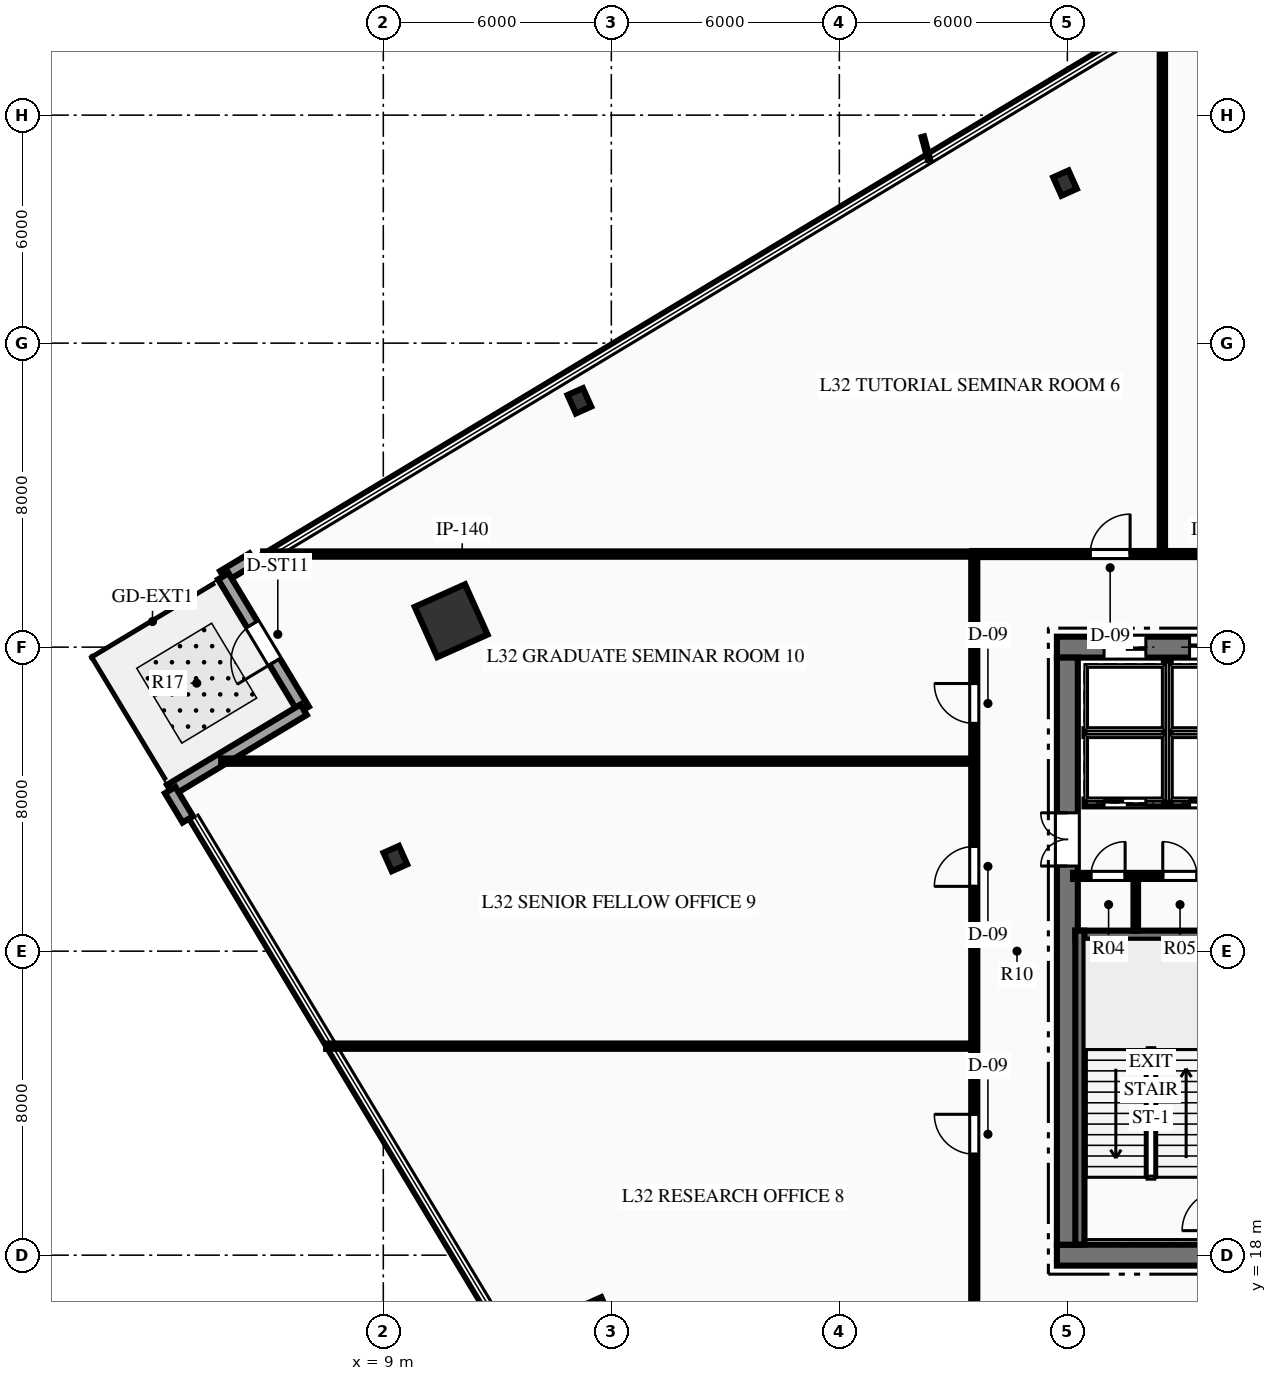
"""IFC4 building model, lengths in metres.
Left out: names, types, materials, properties, quantities, classifications, styles, units other than length and angle.
Written with IfcOpenShell. Run it as: python <this file> out.ifc"""

import sys

from ifc_helpers import new_model, si_unit, direction, frame, frame_2d, origin, origin_2d, place, context, subcontext, project, spatial, rectangle, hollow_rectangle, i_section, extrude, element, fill, save


model = new_model("IFC4")
c1 = context("Model", 3, precision=1e-05, world=origin(), true_north=direction((0.0, 1.0)))
c2 = subcontext(c1, "Body", "Model", "MODEL_VIEW")
j1 = project(units=[si_unit("LENGTHUNIT", "METRE"), si_unit("PLANEANGLEUNIT", "RADIAN")], contexts=[c1])
p1 = place(None, origin())
s1 = spatial("IfcSite", under=j1, at=p1, CompositionType="ELEMENT")
p2 = place(p1, origin())
s2 = spatial("IfcBuilding", under=s1, at=p2, CompositionType="ELEMENT")
p3 = place(p2, frame((0.0, 0.0, 131.7)))
s3 = spatial("IfcBuildingStorey", under=s2, at=p3, CompositionType="ELEMENT", Elevation=131.7)
p4 = place(p3, frame((26.725, 18.0, 0.0), z_axis=(0.0, 0.0, 1.0), x_axis=(1.0, 0.0, 0.0)))
e1 = element("IfcWall", 1, at=p4, inside=s3, PredefinedType="SHEAR", context=c2, shape_type="SweptSolid", body=[
    extrude(rectangle(XDim=18.55, YDim=0.55, at=frame_2d((9.275, 0.0))), origin(), (0.0, 0.0, 1.0), 4.5),
])
p5 = place(p4, frame((7.375, 0.0, 0.0)))
e2 = element("IfcOpeningElement", 2, at=p5, cuts=e1, PredefinedType="OPENING", context=c2, shape_type="SweptSolid", body=[
    extrude(rectangle(XDim=1.1, YDim=2.15, at=frame_2d((0.55, 1.075))), frame((0.0, 0.285, 0.0), z_axis=(0.0, -1.0, 0.0), x_axis=(1.0, 0.0, 0.0)), (0.0, 0.0, 1.0), 0.57),
])
p6 = place(p4, frame((10.075, 0.0, 0.0)))
e3 = element("IfcOpeningElement", 3, at=p6, cuts=e1, PredefinedType="OPENING", context=c2, shape_type="SweptSolid", body=[
    extrude(rectangle(XDim=1.1, YDim=2.15, at=frame_2d((0.55, 1.075))), frame((0.0, 0.285, 0.0), z_axis=(0.0, -1.0, 0.0), x_axis=(1.0, 0.0, 0.0)), (0.0, 0.0, 1.0), 0.57),
])
p7 = place(p3, frame((26.725, 34.0, 0.0), z_axis=(0.0, 0.0, 1.0), x_axis=(1.0, 0.0, 0.0)))
e4 = element("IfcWall", 4, at=p7, inside=s3, PredefinedType="SHEAR", context=c2, shape_type="SweptSolid", body=[
    extrude(rectangle(XDim=18.55, YDim=0.55, at=frame_2d((9.275, 0.0))), origin(), (0.0, 0.0, 1.0), 4.5),
])
p8 = place(p7, frame((1.24, 0.0, 0.0)))
e5 = element("IfcOpeningElement", 5, at=p8, cuts=e4, PredefinedType="OPENING", context=c2, shape_type="SweptSolid", body=[
    extrude(rectangle(XDim=1.1, YDim=2.15, at=frame_2d((0.55, 1.075))), frame((0.0, 0.285, 0.0), z_axis=(0.0, -1.0, 0.0), x_axis=(1.0, 0.0, 0.0)), (0.0, 0.0, 1.0), 0.57),
])
p9 = place(p7, frame((3.49, 0.0, 0.0)))
e6 = element("IfcOpeningElement", 6, at=p9, cuts=e4, PredefinedType="OPENING", context=c2, shape_type="SweptSolid", body=[
    extrude(rectangle(XDim=1.1, YDim=2.15, at=frame_2d((0.55, 1.075))), frame((0.0, 0.285, 0.0), z_axis=(0.0, -1.0, 0.0), x_axis=(1.0, 0.0, 0.0)), (0.0, 0.0, 1.0), 0.57),
])
p10 = place(p7, frame((13.96, 0.0, 0.0)))
e7 = element("IfcOpeningElement", 7, at=p10, cuts=e4, PredefinedType="OPENING", context=c2, shape_type="SweptSolid", body=[
    extrude(rectangle(XDim=1.1, YDim=2.15, at=frame_2d((0.55, 1.075))), frame((0.0, 0.285, 0.0), z_axis=(0.0, -1.0, 0.0), x_axis=(1.0, 0.0, 0.0)), (0.0, 0.0, 1.0), 0.57),
])
p11 = place(p7, frame((16.21, 0.0, 0.0)))
e8 = element("IfcOpeningElement", 8, at=p11, cuts=e4, PredefinedType="OPENING", context=c2, shape_type="SweptSolid", body=[
    extrude(rectangle(XDim=1.1, YDim=2.15, at=frame_2d((0.55, 1.075))), frame((0.0, 0.285, 0.0), z_axis=(0.0, -1.0, 0.0), x_axis=(1.0, 0.0, 0.0)), (0.0, 0.0, 1.0), 0.57),
])
p12 = place(p3, frame((27.0, 18.275, 0.0), z_axis=(0.0, 0.0, 1.0), x_axis=(0.0, 1.0, 0.0)))
e9 = element("IfcWall", 9, at=p12, inside=s3, PredefinedType="SHEAR", context=c2, shape_type="SweptSolid", body=[
    extrude(rectangle(XDim=15.45, YDim=0.55, at=frame_2d((7.725, 0.0))), origin(), (0.0, 0.0, 1.0), 4.5),
])
p13 = place(p12, frame((9.965, 0.0, 0.0)))
e10 = element("IfcOpeningElement", 10, at=p13, cuts=e9, PredefinedType="OPENING", context=c2, shape_type="SweptSolid", body=[
    extrude(rectangle(XDim=1.4, YDim=2.2, at=frame_2d((0.7, 1.1))), frame((0.0, 0.285, 0.0), z_axis=(0.0, -1.0, 0.0), x_axis=(1.0, 0.0, 0.0)), (0.0, 0.0, 1.0), 0.57),
])
p14 = place(p3, frame((27.21, 26.42, 0.0), z_axis=(0.0, 0.0, 1.0), x_axis=(1.0, 0.0, 0.0)))
e11 = element("IfcWall", 11, at=p14, inside=s3, PredefinedType="SHEAR", context=c2, shape_type="SweptSolid", body=[
    extrude(rectangle(XDim=3.98, YDim=0.24, at=frame_2d((1.99, 0.0))), origin(), (0.0, 0.0, 1.0), 4.5),
])
p15 = place(p3, frame((27.33, 18.28, 0.0), z_axis=(0.0, 0.0, 1.0), x_axis=(0.0, 1.0, 0.0)))
e12 = element("IfcWall", 12, at=p15, inside=s3, PredefinedType="SHEAR", context=c2, shape_type="SweptSolid", body=[
    extrude(rectangle(XDim=8.26, YDim=0.24, at=frame_2d((4.13, 0.0))), origin(), (0.0, 0.0, 1.0), 4.5),
])
p16 = place(p3, frame((10.786, 34.695, 0.0), z_axis=(0.0, 0.0, 1.0), x_axis=(0.912477494148, 0.409126902895, 0.0)))
e13 = element("IfcColumn", 13, at=p16, inside=s3, PredefinedType="COLUMN", context=c2, shape_type="SweptSolid", body=[
    extrude(hollow_rectangle(XDim=1.45, YDim=1.45, WallThickness=0.07, at=origin_2d()), origin(), (0.0, 0.0, 1.0), 4.5),
])
for number, where, z_axis, x_axis in (
    (14, (26.938, 46.211, 0.0), (0.0, 0.0, 1.0), (0.912, 0.409, 0.0)),
    (15, (14.159, 40.482, 0.0), (0.0, 0.0, 1.0), (0.912, 0.409, 0.0)),
    (16, (9.318, 28.437, 0.0), (0.0, 0.0, 1.0), (0.912, 0.409, 0.0)),
    (17, (14.643, 16.561, 0.0), (0.0, 0.0, 1.0), (0.912, 0.409, 0.0)),
):
    element("IfcColumn", number, at=place(p3, frame(where, z_axis=z_axis, x_axis=x_axis)), inside=s3, PredefinedType="COLUMN", context=c2, shape_type="SweptSolid", body=[
        extrude(i_section(OverallWidth=0.442, OverallDepth=0.531, WebThickness=0.066, FlangeThickness=0.106, at=origin_2d()), origin(), (0.0, 0.0, 1.0), 4.5),
    ])
p17 = place(p3, frame((4.79, 35.866, 0.0), z_axis=(0.0, 0.0, 1.0), x_axis=(0.856749961863, 0.515732006809, 0.0)))
e18 = element("IfcWall", 18, at=p17, inside=s3, PredefinedType="STANDARD", context=c2, shape_type="SweptSolid", body=[
    extrude(rectangle(XDim=0.9, YDim=0.32, at=frame_2d((0.45, 0.0))), origin(), (0.0, 0.0, 1.0), 4.1),
])
p18 = place(p3, frame((6.904, 32.353, 0.0), z_axis=(0.0, 0.0, 1.0), x_axis=(-0.515773637009, 0.856724900634, 0.0)))
e19 = element("IfcWall", 19, at=p18, inside=s3, PredefinedType="STANDARD", context=c2, shape_type="SweptSolid", body=[
    extrude(rectangle(XDim=4.1, YDim=0.32, at=frame_2d((2.05, 0.0))), origin(), (0.0, 0.0, 1.0), 4.1),
])
p19 = place(p18, frame((1.475, 0.0, 0.0)))
e20 = element("IfcOpeningElement", 20, at=p19, cuts=e19, PredefinedType="OPENING", context=c2, shape_type="SweptSolid", body=[
    extrude(rectangle(XDim=1.15, YDim=2.2, at=frame_2d((0.575, 1.1))), frame((0.0, 0.17, 0.0), z_axis=(0.0, -1.0, 0.0), x_axis=(1.0, 0.0, 0.0)), (0.0, 0.0, 1.0), 0.34),
])
p20 = place(p3, frame((3.392, 30.238, 0.0), z_axis=(0.0, 0.0, 1.0), x_axis=(0.856724900634, 0.515773637009, 0.0)))
e21 = element("IfcWall", 21, at=p20, inside=s3, PredefinedType="STANDARD", context=c2, shape_type="SweptSolid", body=[
    extrude(rectangle(XDim=4.1, YDim=0.32, at=frame_2d((2.05, 0.0))), origin(), (0.0, 0.0, 1.0), 4.1),
])
p21 = place(p3, frame((3.856, 29.467, 0.0), z_axis=(0.0, 0.0, 1.0), x_axis=(-0.51593110119, 0.856630082839, 0.0)))
e22 = element("IfcWall", 22, at=p21, inside=s3, PredefinedType="STANDARD", context=c2, shape_type="SweptSolid", body=[
    extrude(rectangle(XDim=0.9, YDim=0.32, at=frame_2d((0.45, 0.0))), origin(), (0.0, 0.0, 1.0), 4.1),
])
p22 = place(p3, frame((27.15, 27.98, 0.0), z_axis=(0.0, 0.0, 1.0), x_axis=(1.0, 0.0, 0.0)))
e23 = element("IfcWall", 23, at=p22, inside=s3, PredefinedType="PARTITIONING", context=c2, shape_type="SweptSolid", body=[
    extrude(rectangle(XDim=4.05, YDim=0.16, at=frame_2d((2.025, 0.0))), origin(), (0.0, 0.0, 1.0), 4.1),
])
p23 = place(p22, frame((0.47, 0.0, 0.0)))
e24 = element("IfcOpeningElement", 24, at=p23, cuts=e23, PredefinedType="OPENING", context=c2, shape_type="SweptSolid", body=[
    extrude(rectangle(XDim=0.9, YDim=2.15, at=frame_2d((0.45, 1.075))), frame((0.0, 0.09, 0.0), z_axis=(0.0, -1.0, 0.0), x_axis=(1.0, 0.0, 0.0)), (0.0, 0.0, 1.0), 0.18),
])
p24 = place(p22, frame((2.36, 0.0, 0.0)))
e25 = element("IfcOpeningElement", 25, at=p24, cuts=e23, PredefinedType="OPENING", context=c2, shape_type="SweptSolid", body=[
    extrude(rectangle(XDim=0.9, YDim=2.15, at=frame_2d((0.45, 1.075))), frame((0.0, 0.09, 0.0), z_axis=(0.0, -1.0, 0.0), x_axis=(1.0, 0.0, 0.0)), (0.0, 0.0, 1.0), 0.18),
])
p25 = place(p3, frame((28.8, 26.54, 0.0), z_axis=(0.0, 0.0, 1.0), x_axis=(0.0, 1.0, 0.0)))
e26 = element("IfcWall", 26, at=p25, inside=s3, PredefinedType="PARTITIONING", context=c2, shape_type="SweptSolid", body=[
    extrude(rectangle(XDim=1.44, YDim=0.12, at=frame_2d((0.72, 0.0))), origin(), (0.0, 0.0, 1.0), 4.1),
])
p26 = place(p3, frame((27.45, 29.9, 0.0), z_axis=(0.0, 0.0, 1.0), x_axis=(1.0, 0.0, 0.0)))
e27 = element("IfcWall", 27, at=p26, inside=s3, PredefinedType="PARTITIONING", context=c2, shape_type="SweptSolid", body=[
    extrude(rectangle(XDim=4.43, YDim=0.18, at=frame_2d((2.215, 0.0))), origin(), (0.0, 0.0, 1.0), 4.1),
])
p27 = place(p26, frame((0.515, 0.0, 0.0)))
e28 = element("IfcOpeningElement", 28, at=p27, cuts=e27, PredefinedType="OPENING", context=c2, shape_type="SweptSolid", body=[
    extrude(rectangle(XDim=1.1, YDim=2.15, at=frame_2d((0.55, 1.075))), frame((0.0, 0.1, 0.0), z_axis=(0.0, -1.0, 0.0), x_axis=(1.0, 0.0, 0.0)), (0.0, 0.0, 1.0), 0.2),
])
p28 = place(p26, frame((2.765, 0.0, 0.0)))
e29 = element("IfcOpeningElement", 29, at=p28, cuts=e27, PredefinedType="OPENING", context=c2, shape_type="SweptSolid", body=[
    extrude(rectangle(XDim=1.1, YDim=2.15, at=frame_2d((0.55, 1.075))), frame((0.0, 0.1, 0.0), z_axis=(0.0, -1.0, 0.0), x_axis=(1.0, 0.0, 0.0)), (0.0, 0.0, 1.0), 0.2),
])
p29 = place(p3, frame((27.45, 31.75, 0.0), z_axis=(0.0, 0.0, 1.0), x_axis=(1.0, 0.0, 0.0)))
e30 = element("IfcWall", 30, at=p29, inside=s3, PredefinedType="PARTITIONING", context=c2, shape_type="SweptSolid", body=[
    extrude(rectangle(XDim=4.43, YDim=0.18, at=frame_2d((2.215, 0.0))), origin(), (0.0, 0.0, 1.0), 4.1),
])
p30 = place(p3, frame((29.63, 29.9, 0.0), z_axis=(0.0, 0.0, 1.0), x_axis=(0.0, 1.0, 0.0)))
e31 = element("IfcWall", 31, at=p30, inside=s3, PredefinedType="PARTITIONING", context=c2, shape_type="SweptSolid", body=[
    extrude(rectangle(XDim=3.75, YDim=0.18, at=frame_2d((1.875, 0.0))), origin(), (0.0, 0.0, 1.0), 4.1),
])
p31 = place(p3, frame((24.5, 36.45, 0.0), z_axis=(0.0, 0.0, 1.0), x_axis=(1.0, 0.0, 0.0)))
e32 = element("IfcWall", 32, at=p31, inside=s3, PredefinedType="PARTITIONING", context=c2, shape_type="SweptSolid", body=[
    extrude(rectangle(XDim=23.0, YDim=0.16, at=frame_2d((11.5, 0.0))), origin(), (0.0, 0.0, 1.0), 4.1),
])
p32 = place(p31, frame((13.75, 0.0, 0.0)))
e33 = element("IfcOpeningElement", 33, at=p32, cuts=e32, PredefinedType="OPENING", context=c2, shape_type="SweptSolid", body=[
    extrude(rectangle(XDim=0.9, YDim=2.15, at=frame_2d((0.45, 1.075))), frame((0.0, 0.09, 0.0), z_axis=(0.0, -1.0, 0.0), x_axis=(1.0, 0.0, 0.0)), (0.0, 0.0, 1.0), 0.18),
])
p33 = place(p31, frame((16.05, 0.0, 0.0)))
e34 = element("IfcOpeningElement", 34, at=p33, cuts=e32, PredefinedType="OPENING", context=c2, shape_type="SweptSolid", body=[
    extrude(rectangle(XDim=0.9, YDim=2.15, at=frame_2d((0.45, 1.075))), frame((0.0, 0.09, 0.0), z_axis=(0.0, -1.0, 0.0), x_axis=(1.0, 0.0, 0.0)), (0.0, 0.0, 1.0), 0.18),
])
p34 = place(p31, frame((18.3, 0.0, 0.0)))
e35 = element("IfcOpeningElement", 35, at=p34, cuts=e32, PredefinedType="OPENING", context=c2, shape_type="SweptSolid", body=[
    extrude(rectangle(XDim=1.0, YDim=2.15, at=frame_2d((0.5, 1.075))), frame((0.0, 0.09, 0.0), z_axis=(0.0, -1.0, 0.0), x_axis=(1.0, 0.0, 0.0)), (0.0, 0.0, 1.0), 0.18),
])
p35 = place(p31, frame((3.101, 0.0, 0.0)))
e36 = element("IfcOpeningElement", 36, at=p35, cuts=e32, PredefinedType="OPENING", context=c2, shape_type="SweptSolid", body=[
    extrude(rectangle(XDim=1.05, YDim=2.15, at=frame_2d((0.525, 1.075))), frame((0.0, 0.09, 0.0), z_axis=(0.0, -1.0, 0.0), x_axis=(1.0, 0.0, 0.0)), (0.0, 0.0, 1.0), 0.18),
])
p36 = place(p31, frame((10.055, 0.0, 0.0)))
e37 = element("IfcOpeningElement", 37, at=p36, cuts=e32, PredefinedType="OPENING", context=c2, shape_type="SweptSolid", body=[
    extrude(rectangle(XDim=1.05, YDim=2.15, at=frame_2d((0.525, 1.075))), frame((0.0, 0.09, 0.0), z_axis=(0.0, -1.0, 0.0), x_axis=(1.0, 0.0, 0.0)), (0.0, 0.0, 1.0), 0.18),
])
p37 = place(p3, frame((24.55, 15.55, 0.0), z_axis=(0.0, 0.0, 1.0), x_axis=(0.0, 1.0, 0.0)))
e38 = element("IfcWall", 38, at=p37, inside=s3, PredefinedType="PARTITIONING", context=c2, shape_type="SweptSolid", body=[
    extrude(rectangle(XDim=20.9, YDim=0.16, at=frame_2d((10.45, 0.0))), origin(), (0.0, 0.0, 1.0), 4.1),
])
p38 = place(p37, frame((5.107, 0.0, 0.0)))
e39 = element("IfcOpeningElement", 39, at=p38, cuts=e38, PredefinedType="OPENING", context=c2, shape_type="SweptSolid", body=[
    extrude(rectangle(XDim=1.05, YDim=2.15, at=frame_2d((0.525, 1.075))), frame((0.0, 0.09, 0.0), z_axis=(0.0, -1.0, 0.0), x_axis=(1.0, 0.0, 0.0)), (0.0, 0.0, 1.0), 0.18),
])
p39 = place(p37, frame((12.155, 0.0, 0.0)))
e40 = element("IfcOpeningElement", 40, at=p39, cuts=e38, PredefinedType="OPENING", context=c2, shape_type="SweptSolid", body=[
    extrude(rectangle(XDim=1.05, YDim=2.15, at=frame_2d((0.525, 1.075))), frame((0.0, 0.09, 0.0), z_axis=(0.0, -1.0, 0.0), x_axis=(1.0, 0.0, 0.0)), (0.0, 0.0, 1.0), 0.18),
])
p40 = place(p37, frame((16.443, 0.0, 0.0)))
e41 = element("IfcOpeningElement", 41, at=p40, cuts=e38, PredefinedType="OPENING", context=c2, shape_type="SweptSolid", body=[
    extrude(rectangle(XDim=1.05, YDim=2.15, at=frame_2d((0.525, 1.075))), frame((0.0, 0.09, 0.0), z_axis=(0.0, -1.0, 0.0), x_axis=(1.0, 0.0, 0.0)), (0.0, 0.0, 1.0), 0.18),
])
p41 = place(p3, frame((5.838, 36.45, 0.0), z_axis=(0.0, 0.0, 1.0), x_axis=(1.0, 0.0, 0.0)))
e42 = element("IfcWall", 42, at=p41, inside=s3, PredefinedType="PARTITIONING", context=c2, shape_type="SweptSolid", body=[
    extrude(rectangle(XDim=18.712, YDim=0.14, at=frame_2d((9.356, 0.0))), origin(), (0.0, 0.0, 1.0), 4.1),
])
p42 = place(p3, frame((29.5, 36.45, 0.0), z_axis=(0.0, 0.0, 1.0), x_axis=(0.0, 1.0, 0.0)))
e43 = element("IfcWall", 43, at=p42, inside=s3, PredefinedType="PARTITIONING", context=c2, shape_type="SweptSolid", body=[
    extrude(rectangle(XDim=14.246, YDim=0.14, at=frame_2d((7.123, 0.0))), origin(), (0.0, 0.0, 1.0), 4.1),
])
p43 = place(p3, frame((7.495, 23.5, 0.0), z_axis=(0.0, 0.0, 1.0), x_axis=(1.0, 0.0, 0.0)))
e44 = element("IfcWall", 44, at=p43, inside=s3, PredefinedType="PARTITIONING", context=c2, shape_type="SweptSolid", body=[
    extrude(rectangle(XDim=17.055, YDim=0.14, at=frame_2d((8.527, 0.0))), origin(), (0.0, 0.0, 1.0), 4.1),
])
p44 = place(p3, frame((4.734, 31.0, 0.0), z_axis=(0.0, 0.0, 1.0), x_axis=(1.0, 0.0, 0.0)))
e45 = element("IfcWall", 45, at=p44, inside=s3, PredefinedType="PARTITIONING", context=c2, shape_type="SweptSolid", body=[
    extrude(rectangle(XDim=19.816, YDim=0.14, at=frame_2d((9.908, 0.0))), origin(), (0.0, 0.0, 1.0), 4.1),
])
p45 = place(p19, origin())
e46 = element("IfcDoor", 46, at=p45, inside=s3, OperationType="SINGLE_SWING_LEFT", PredefinedType="DOOR", context=c2, shape_type="SweptSolid", body=[
    extrude(rectangle(XDim=1.15, YDim=2.2, at=frame_2d((0.575, 1.1))), frame((0.0, 0.025, 0.0), z_axis=(0.0, -1.0, 0.0), x_axis=(1.0, 0.0, 0.0)), (0.0, 0.0, 1.0), 0.05),
])
fill(e20, e46)
p46 = place(p23, origin())
e47 = element("IfcDoor", 47, at=p46, inside=s3, OperationType="SINGLE_SWING_RIGHT", PredefinedType="DOOR", context=c2, shape_type="SweptSolid", body=[
    extrude(rectangle(XDim=0.9, YDim=2.15, at=frame_2d((0.45, 1.075))), frame((0.0, 0.025, 0.0), z_axis=(0.0, -1.0, 0.0), x_axis=(1.0, 0.0, 0.0)), (0.0, 0.0, 1.0), 0.05),
])
fill(e24, e47)
p47 = place(p24, origin())
e48 = element("IfcDoor", 48, at=p47, inside=s3, OperationType="SINGLE_SWING_LEFT", PredefinedType="DOOR", context=c2, shape_type="SweptSolid", body=[
    extrude(rectangle(XDim=0.9, YDim=2.15, at=frame_2d((0.45, 1.075))), frame((0.0, 0.025, 0.0), z_axis=(0.0, -1.0, 0.0), x_axis=(1.0, 0.0, 0.0)), (0.0, 0.0, 1.0), 0.05),
])
fill(e25, e48)
p48 = place(p13, origin())
e49 = element("IfcDoor", 49, at=p48, inside=s3, OperationType="DOUBLE_DOOR_SINGLE_SWING", PredefinedType="DOOR", context=c2, shape_type="SweptSolid", body=[
    extrude(rectangle(XDim=1.4, YDim=2.2, at=frame_2d((0.7, 1.1))), frame((0.0, 0.025, 0.0), z_axis=(0.0, -1.0, 0.0), x_axis=(1.0, 0.0, 0.0)), (0.0, 0.0, 1.0), 0.05),
])
fill(e10, e49)
p49 = place(p35, origin())
e50 = element("IfcDoor", 50, at=p49, inside=s3, OperationType="SINGLE_SWING_RIGHT", PredefinedType="DOOR", context=c2, shape_type="SweptSolid", body=[
    extrude(rectangle(XDim=1.05, YDim=2.15, at=frame_2d((0.525, 1.075))), frame((0.0, 0.025, 0.0), z_axis=(0.0, -1.0, 0.0), x_axis=(1.0, 0.0, 0.0)), (0.0, 0.0, 1.0), 0.05),
])
fill(e36, e50)
p50 = place(p38, origin())
e51 = element("IfcDoor", 51, at=p50, inside=s3, OperationType="SINGLE_SWING_RIGHT", PredefinedType="DOOR", context=c2, shape_type="SweptSolid", body=[
    extrude(rectangle(XDim=1.05, YDim=2.15, at=frame_2d((0.525, 1.075))), frame((0.0, 0.025, 0.0), z_axis=(0.0, -1.0, 0.0), x_axis=(1.0, 0.0, 0.0)), (0.0, 0.0, 1.0), 0.05),
])
fill(e39, e51)
p51 = place(p39, origin())
e52 = element("IfcDoor", 52, at=p51, inside=s3, OperationType="SINGLE_SWING_LEFT", PredefinedType="DOOR", context=c2, shape_type="SweptSolid", body=[
    extrude(rectangle(XDim=1.05, YDim=2.15, at=frame_2d((0.525, 1.075))), frame((0.0, 0.025, 0.0), z_axis=(0.0, -1.0, 0.0), x_axis=(1.0, 0.0, 0.0)), (0.0, 0.0, 1.0), 0.05),
])
fill(e40, e52)
p52 = place(p40, origin())
e53 = element("IfcDoor", 53, at=p52, inside=s3, OperationType="SINGLE_SWING_RIGHT", PredefinedType="DOOR", context=c2, shape_type="SweptSolid", body=[
    extrude(rectangle(XDim=1.05, YDim=2.15, at=frame_2d((0.525, 1.075))), frame((0.0, 0.025, 0.0), z_axis=(0.0, -1.0, 0.0), x_axis=(1.0, 0.0, 0.0)), (0.0, 0.0, 1.0), 0.05),
])
fill(e41, e53)
p53 = place(p27, origin())
e54 = element("IfcDoor", 54, at=p53, inside=s3, OperationType="SLIDING_TO_LEFT", PredefinedType="DOOR", context=c2, shape_type="SweptSolid", body=[
    extrude(rectangle(XDim=1.1, YDim=2.15, at=frame_2d((0.55, 1.075))), frame((0.0, 0.025, 0.0), z_axis=(0.0, -1.0, 0.0), x_axis=(1.0, 0.0, 0.0)), (0.0, 0.0, 1.0), 0.05),
])
fill(e28, e54)
p54 = place(p28, origin())
e55 = element("IfcDoor", 55, at=p54, inside=s3, OperationType="SLIDING_TO_LEFT", PredefinedType="DOOR", context=c2, shape_type="SweptSolid", body=[
    extrude(rectangle(XDim=1.1, YDim=2.15, at=frame_2d((0.55, 1.075))), frame((0.0, 0.025, 0.0), z_axis=(0.0, -1.0, 0.0), x_axis=(1.0, 0.0, 0.0)), (0.0, 0.0, 1.0), 0.05),
])
fill(e29, e55)
p55 = place(p8, origin())
e56 = element("IfcDoor", 56, at=p55, inside=s3, OperationType="SLIDING_TO_LEFT", PredefinedType="DOOR", context=c2, shape_type="SweptSolid", body=[
    extrude(rectangle(XDim=1.1, YDim=2.15, at=frame_2d((0.55, 1.075))), frame((0.0, 0.025, 0.0), z_axis=(0.0, -1.0, 0.0), x_axis=(1.0, 0.0, 0.0)), (0.0, 0.0, 1.0), 0.05),
])
fill(e5, e56)
p56 = place(p9, origin())
e57 = element("IfcDoor", 57, at=p56, inside=s3, OperationType="SLIDING_TO_LEFT", PredefinedType="DOOR", context=c2, shape_type="SweptSolid", body=[
    extrude(rectangle(XDim=1.1, YDim=2.15, at=frame_2d((0.55, 1.075))), frame((0.0, 0.025, 0.0), z_axis=(0.0, -1.0, 0.0), x_axis=(1.0, 0.0, 0.0)), (0.0, 0.0, 1.0), 0.05),
])
fill(e6, e57)
save(model, sys.argv[1])
